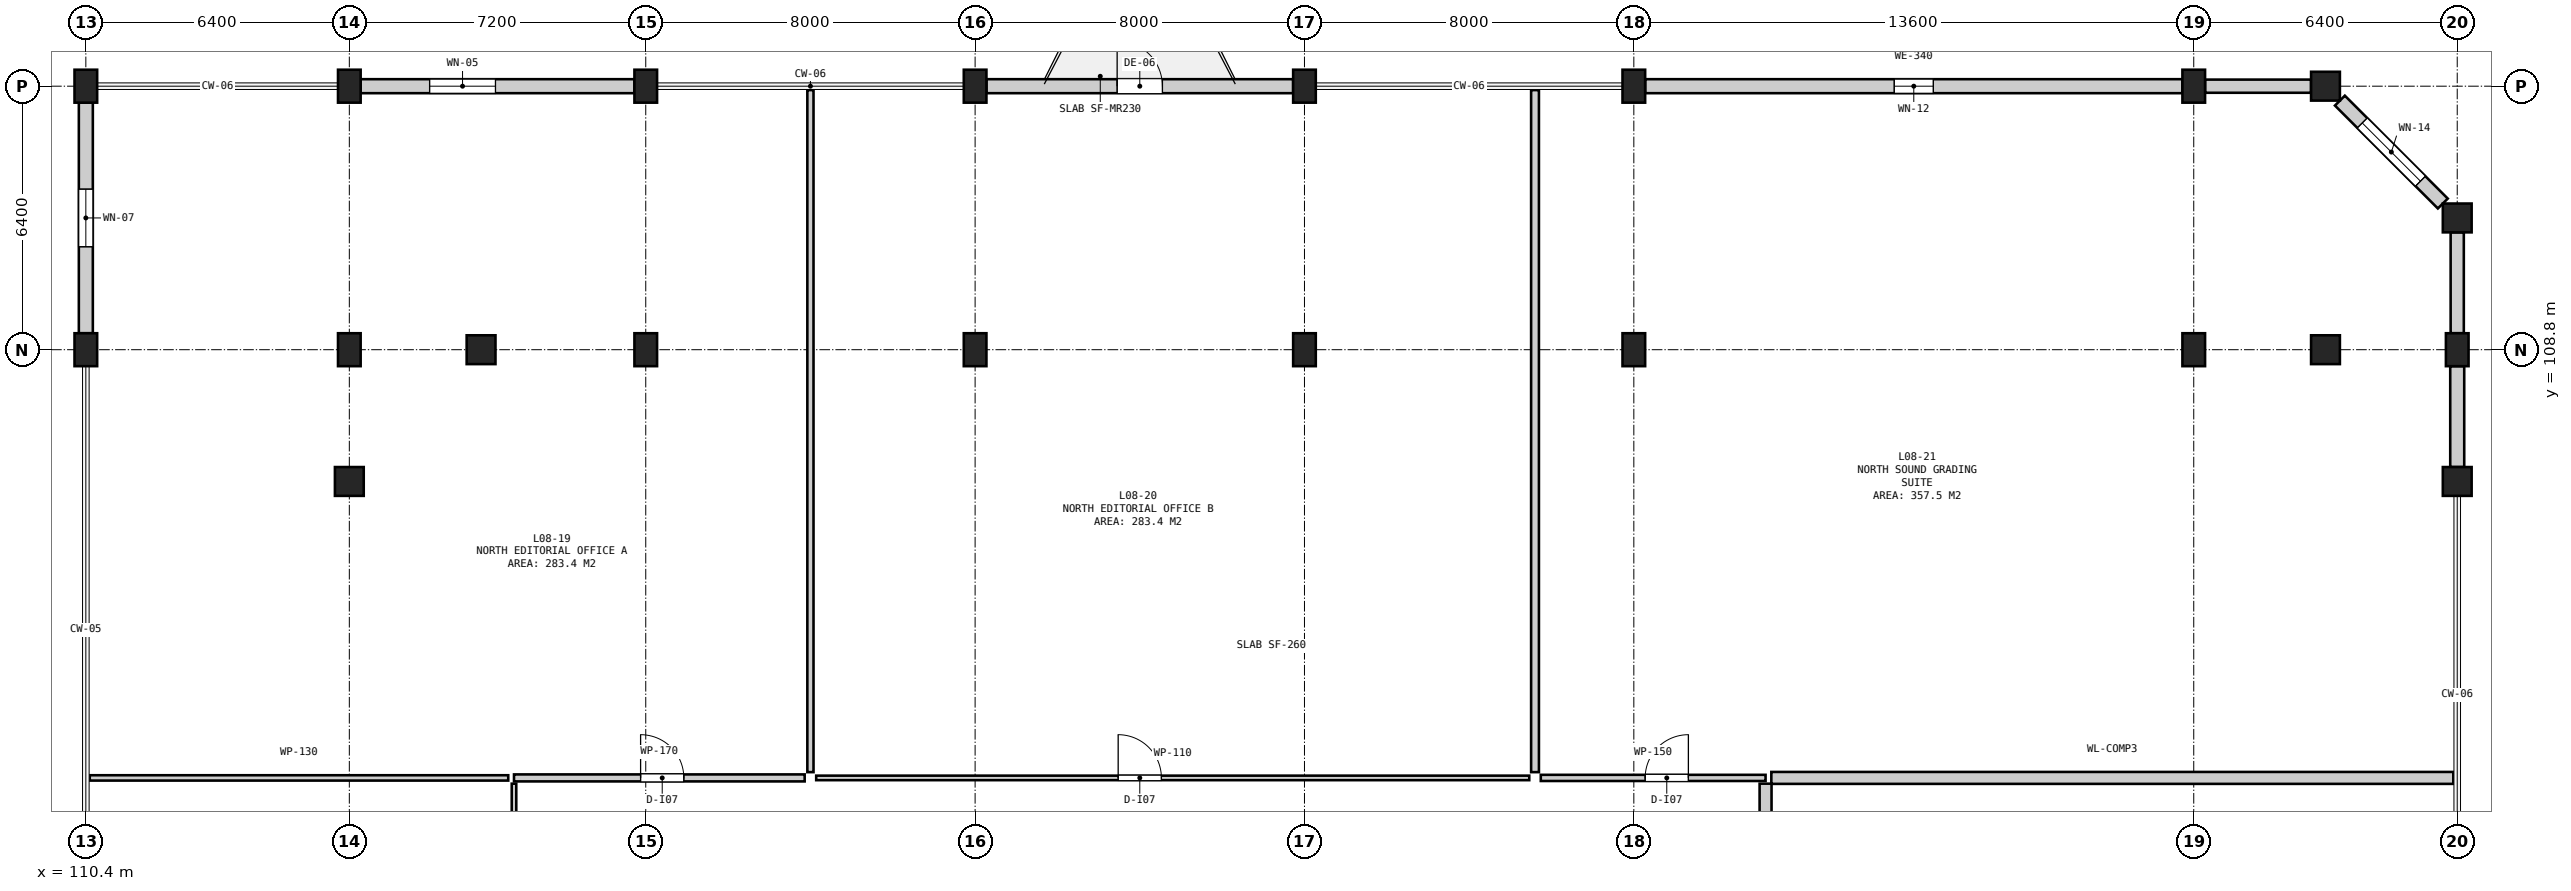
"""IFC4 building model, lengths in metres.
Left out: names, types, materials, properties, quantities, classifications, styles, units other than length and angle.
Written with IfcOpenShell. Run it as: python <this file> out.ifc"""

import sys

from ifc_helpers import new_model, si_unit, direction, frame, frame_2d, origin, origin_2d, place, context, subcontext, project, spatial, rectangle, circle, extrude, element, fill, save


model = new_model("IFC4")
c1 = context("Model", 3, precision=1e-05, world=origin(), true_north=direction((0.0, 1.0)))
c2 = subcontext(c1, "Body", "Model", "MODEL_VIEW")
j1 = project(units=[si_unit("LENGTHUNIT", "METRE"), si_unit("PLANEANGLEUNIT", "RADIAN")], contexts=[c1])
p1 = place(None, origin())
s1 = spatial("IfcSite", under=j1, at=p1, CompositionType="ELEMENT")
p2 = place(p1, origin())
s2 = spatial("IfcBuilding", under=s1, at=p2, CompositionType="ELEMENT")
p3 = place(p2, frame((0.0, 0.0, 35.6)))
s3 = spatial("IfcBuildingStorey", under=s2, at=p3, CompositionType="ELEMENT", Elevation=35.6)
for number, where, z_axis, x_axis in (
    (1, (110.4, 108.8, 0.0), (0.0, 0.0, 1.0), (1.0, 0.0, 0.0)),
    (2, (110.4, 115.2, 0.0), (0.0, 0.0, 1.0), (1.0, 0.0, 0.0)),
):
    element("IfcColumn", number, at=place(p3, frame(where, z_axis=z_axis, x_axis=x_axis)), inside=s3, PredefinedType="COLUMN", context=c2, shape_type="SweptSolid", body=[
        extrude(rectangle(XDim=0.55, YDim=0.8, at=origin_2d()), origin(), (0.0, 0.0, 1.0), 3.9),
    ])
p4 = place(p3, frame((116.8, 105.6, 0.0), z_axis=(0.0, 0.0, 1.0), x_axis=(1.0, 0.0, 0.0)))
e3 = element("IfcColumn", 3, at=p4, inside=s3, PredefinedType="COLUMN", context=c2, shape_type="SweptSolid", body=[
    extrude(circle(Radius=0.35, at=origin_2d()), origin(), (0.0, 0.0, 1.0), 3.9),
])
for number, where, z_axis, x_axis in (
    (4, (116.8, 108.8, 0.0), (0.0, 0.0, 1.0), (1.0, 0.0, 0.0)),
    (5, (116.8, 115.2, 0.0), (0.0, 0.0, 1.0), (1.0, 0.0, 0.0)),
):
    element("IfcColumn", number, at=place(p3, frame(where, z_axis=z_axis, x_axis=x_axis)), inside=s3, PredefinedType="COLUMN", context=c2, shape_type="SweptSolid", body=[
        extrude(rectangle(XDim=0.55, YDim=0.8, at=origin_2d()), origin(), (0.0, 0.0, 1.0), 3.9),
    ])
p5 = place(p3, frame((120.0, 108.8, 0.0), z_axis=(0.0, 0.0, 1.0), x_axis=(1.0, 0.0, 0.0)))
e6 = element("IfcColumn", 6, at=p5, inside=s3, PredefinedType="COLUMN", context=c2, shape_type="SweptSolid", body=[
    extrude(circle(Radius=0.35, at=origin_2d()), origin(), (0.0, 0.0, 1.0), 3.9),
])
for number, where, z_axis, x_axis in (
    (7, (124.0, 108.8, 0.0), (0.0, 0.0, 1.0), (1.0, 0.0, 0.0)),
    (8, (124.0, 115.2, 0.0), (0.0, 0.0, 1.0), (1.0, 0.0, 0.0)),
    (9, (132.0, 108.8, 0.0), (0.0, 0.0, 1.0), (1.0, 0.0, 0.0)),
    (10, (132.0, 115.2, 0.0), (0.0, 0.0, 1.0), (1.0, 0.0, 0.0)),
    (11, (140.0, 108.8, 0.0), (0.0, 0.0, 1.0), (1.0, 0.0, 0.0)),
    (12, (140.0, 115.2, 0.0), (0.0, 0.0, 1.0), (1.0, 0.0, 0.0)),
    (13, (148.0, 108.8, 0.0), (0.0, 0.0, 1.0), (1.0, 0.0, 0.0)),
    (14, (148.0, 115.2, 0.0), (0.0, 0.0, 1.0), (1.0, 0.0, 0.0)),
    (15, (161.6, 108.8, 0.0), (0.0, 0.0, 1.0), (1.0, 0.0, 0.0)),
    (16, (161.6, 115.2, 0.0), (0.0, 0.0, 1.0), (1.0, 0.0, 0.0)),
):
    element("IfcColumn", number, at=place(p3, frame(where, z_axis=z_axis, x_axis=x_axis)), inside=s3, PredefinedType="COLUMN", context=c2, shape_type="SweptSolid", body=[
        extrude(rectangle(XDim=0.55, YDim=0.8, at=origin_2d()), origin(), (0.0, 0.0, 1.0), 3.9),
    ])
for number, where, z_axis, x_axis in (
    (17, (164.8, 108.8, 0.0), (0.0, 0.0, 1.0), (1.0, 0.0, 0.0)),
    (18, (164.8, 115.2, 0.0), (0.0, 0.0, 1.0), (1.0, 0.0, 0.0)),
    (19, (168.0, 105.6, 0.0), (0.0, 0.0, 1.0), (1.0, 0.0, 0.0)),
):
    element("IfcColumn", number, at=place(p3, frame(where, z_axis=z_axis, x_axis=x_axis)), inside=s3, PredefinedType="COLUMN", context=c2, shape_type="SweptSolid", body=[
        extrude(circle(Radius=0.35, at=origin_2d()), origin(), (0.0, 0.0, 1.0), 3.9),
    ])
p6 = place(p3, frame((168.0, 108.8, 0.0), z_axis=(0.0, 0.0, 1.0), x_axis=(1.0, 0.0, 0.0)))
e20 = element("IfcColumn", 20, at=p6, inside=s3, PredefinedType="COLUMN", context=c2, shape_type="SweptSolid", body=[
    extrude(rectangle(XDim=0.55, YDim=0.8, at=origin_2d()), origin(), (0.0, 0.0, 1.0), 3.9),
])
p7 = place(p3, frame((168.0, 112.0, 0.0), z_axis=(0.0, 0.0, 1.0), x_axis=(1.0, 0.0, 0.0)))
e21 = element("IfcColumn", 21, at=p7, inside=s3, PredefinedType="COLUMN", context=c2, shape_type="SweptSolid", body=[
    extrude(circle(Radius=0.35, at=origin_2d()), origin(), (0.0, 0.0, 1.0), 3.9),
])
p8 = place(p3, frame((168.0, 105.95, 0.0), z_axis=(0.0, 0.0, 1.0), x_axis=(0.0, 1.0, 0.0)))
e22 = element("IfcWall", 22, at=p8, inside=s3, PredefinedType="SOLIDWALL", context=c2, shape_type="SweptSolid", body=[
    extrude(rectangle(XDim=2.45, YDim=0.34, at=frame_2d((1.225, 0.0))), origin(), (0.0, 0.0, 1.0), 2.585),
])
p9 = place(p3, frame((168.0, 109.2, 0.0), z_axis=(0.0, 0.0, 1.0), x_axis=(0.0, 1.0, 0.0)))
e23 = element("IfcWall", 23, at=p9, inside=s3, PredefinedType="SOLIDWALL", context=c2, shape_type="SweptSolid", body=[
    extrude(rectangle(XDim=2.45, YDim=0.32, at=frame_2d((1.225, 0.0))), origin(), (0.0, 0.0, 1.0), 3.0),
])
p10 = place(p3, frame((167.65, 112.35, 0.0), z_axis=(0.0, 0.0, 1.0), x_axis=(-0.707106781187, 0.707106781187, 0.0)))
e24 = element("IfcWall", 24, at=p10, inside=s3, PredefinedType="SOLIDWALL", context=c2, shape_type="SweptSolid", body=[
    extrude(rectangle(XDim=3.536, YDim=0.34, at=frame_2d((1.768, 0.0))), origin(), (0.0, 0.0, 1.0), 2.995),
])
p11 = place(p10, frame((0.768, 0.0, 0.9)))
e25 = element("IfcOpeningElement", 25, at=p11, cuts=e24, PredefinedType="OPENING", context=c2, shape_type="SweptSolid", body=[
    extrude(rectangle(XDim=2.0, YDim=1.65, at=frame_2d((1.0, 0.825))), frame((0.0, 0.182, 0.0), z_axis=(0.0, -1.0, 0.0), x_axis=(1.0, 0.0, 0.0)), (0.0, 0.0, 1.0), 0.364),
])
p12 = place(p3, frame((164.45, 115.2, 0.0), z_axis=(0.0, 0.0, 1.0), x_axis=(-1.0, 0.0, 0.0)))
e26 = element("IfcWall", 26, at=p12, inside=s3, PredefinedType="SOLIDWALL", context=c2, shape_type="SweptSolid", body=[
    extrude(rectangle(XDim=2.575, YDim=0.32, at=frame_2d((1.288, 0.0))), origin(), (0.0, 0.0, 1.0), 3.0),
])
p13 = place(p3, frame((161.325, 115.2, 0.0), z_axis=(0.0, 0.0, 1.0), x_axis=(-1.0, 0.0, 0.0)))
e27 = element("IfcWall", 27, at=p13, inside=s3, PredefinedType="SOLIDWALL", context=c2, shape_type="SweptSolid", body=[
    extrude(rectangle(XDim=13.05, YDim=0.34, at=frame_2d((6.525, 0.0))), origin(), (0.0, 0.0, 1.0), 2.535),
])
p14 = place(p13, frame((6.05, 0.0, 0.8)))
e28 = element("IfcOpeningElement", 28, at=p14, cuts=e27, PredefinedType="OPENING", context=c2, shape_type="SweptSolid", body=[
    extrude(rectangle(XDim=0.95, YDim=1.45, at=frame_2d((0.475, 0.725))), frame((0.0, 0.182, 0.0), z_axis=(0.0, -1.0, 0.0), x_axis=(1.0, 0.0, 0.0)), (0.0, 0.0, 1.0), 0.364),
])
p15 = place(p3, frame((139.725, 115.2, 0.0), z_axis=(0.0, 0.0, 1.0), x_axis=(-1.0, 0.0, 0.0)))
e29 = element("IfcWall", 29, at=p15, inside=s3, PredefinedType="SOLIDWALL", context=c2, shape_type="SweptSolid", body=[
    extrude(rectangle(XDim=7.45, YDim=0.34, at=frame_2d((3.725, 0.0))), origin(), (0.0, 0.0, 1.0), 3.0),
])
p16 = place(p15, frame((3.175, 0.0, 0.0)))
e30 = element("IfcOpeningElement", 30, at=p16, cuts=e29, PredefinedType="OPENING", context=c2, shape_type="SweptSolid", body=[
    extrude(rectangle(XDim=1.1, YDim=2.2, at=frame_2d((0.55, 1.1))), frame((0.0, 0.182, 0.0), z_axis=(0.0, -1.0, 0.0), x_axis=(1.0, 0.0, 0.0)), (0.0, 0.0, 1.0), 0.364),
])
p17 = place(p3, frame((123.725, 115.2, 0.0), z_axis=(0.0, 0.0, 1.0), x_axis=(-1.0, 0.0, 0.0)))
e31 = element("IfcWall", 31, at=p17, inside=s3, PredefinedType="SOLIDWALL", context=c2, shape_type="SweptSolid", body=[
    extrude(rectangle(XDim=6.65, YDim=0.34, at=frame_2d((3.325, 0.0))), origin(), (0.0, 0.0, 1.0), 3.0),
])
p18 = place(p17, frame((3.375, 0.0, 0.9)))
e32 = element("IfcOpeningElement", 32, at=p18, cuts=e31, PredefinedType="OPENING", context=c2, shape_type="SweptSolid", body=[
    extrude(rectangle(XDim=1.6, YDim=1.95, at=frame_2d((0.8, 0.975))), frame((0.0, 0.182, 0.0), z_axis=(0.0, -1.0, 0.0), x_axis=(1.0, 0.0, 0.0)), (0.0, 0.0, 1.0), 0.364),
])
p19 = place(p3, frame((110.4, 114.8, 0.0), z_axis=(0.0, 0.0, 1.0), x_axis=(0.0, -1.0, 0.0)))
e33 = element("IfcWall", 33, at=p19, inside=s3, PredefinedType="SOLIDWALL", context=c2, shape_type="SweptSolid", body=[
    extrude(rectangle(XDim=5.6, YDim=0.34, at=frame_2d((2.8, 0.0))), origin(), (0.0, 0.0, 1.0), 3.0),
])
p20 = place(p19, frame((2.1, 0.0, 0.9)))
e34 = element("IfcOpeningElement", 34, at=p20, cuts=e33, PredefinedType="OPENING", context=c2, shape_type="SweptSolid", body=[
    extrude(rectangle(XDim=1.4, YDim=1.8, at=frame_2d((0.7, 0.9))), frame((0.0, 0.182, 0.0), z_axis=(0.0, -1.0, 0.0), x_axis=(1.0, 0.0, 0.0)), (0.0, 0.0, 1.0), 0.364),
])
p21 = place(p3, frame((151.34, 98.4, 0.0), z_axis=(0.0, 0.0, 1.0), x_axis=(1.0, 0.0, 0.0)))
e35 = element("IfcWall", 35, at=p21, inside=s3, PredefinedType="SOLIDWALL", context=c2, shape_type="SweptSolid", body=[
    extrude(rectangle(XDim=16.565, YDim=0.29, at=frame_2d((8.282, 0.0))), origin(), (0.0, 0.0, 1.0), 3.62),
])
p22 = place(p3, frame((151.2, 76.0, 0.0), z_axis=(0.0, 0.0, 1.0), x_axis=(0.0, 1.0, 0.0)))
e36 = element("IfcWall", 36, at=p22, inside=s3, PredefinedType="SOLIDWALL", context=c2, shape_type="SweptSolid", body=[
    extrude(rectangle(XDim=22.26, YDim=0.29, at=frame_2d((11.13, 0.0))), origin(), (0.0, 0.0, 1.0), 3.62),
])
p23 = place(p22, frame((10.5, 0.0, 0.0)))
e37 = element("IfcOpeningElement", 37, at=p23, cuts=e36, PredefinedType="OPENING", context=c2, shape_type="SweptSolid", body=[
    extrude(rectangle(XDim=1.4, YDim=2.2, at=frame_2d((0.7, 1.1))), frame((0.0, 0.157, 0.0), z_axis=(0.0, -1.0, 0.0), x_axis=(1.0, 0.0, 0.0)), (0.0, 0.0, 1.0), 0.314),
])
p24 = place(p3, frame((110.495, 98.4, 0.0), z_axis=(0.0, 0.0, 1.0), x_axis=(1.0, 0.0, 0.0)))
e38 = element("IfcWall", 38, at=p24, inside=s3, PredefinedType="PARTITIONING", context=c2, shape_type="SweptSolid", body=[
    extrude(rectangle(XDim=10.165, YDim=0.13, at=frame_2d((5.083, 0.0))), origin(), (0.0, 0.0, 1.0), 3.62),
])
p25 = place(p3, frame((120.8, 76.14, 0.0), z_axis=(0.0, 0.0, 1.0), x_axis=(0.0, 1.0, 0.0)))
e39 = element("IfcWall", 39, at=p25, inside=s3, PredefinedType="PARTITIONING", context=c2, shape_type="SweptSolid", body=[
    extrude(rectangle(XDim=22.12, YDim=0.11, at=frame_2d((11.06, 0.0))), origin(), (0.0, 0.0, 1.0), 3.62),
])
p26 = place(p25, frame((10.535, 0.0, 0.0)))
e40 = element("IfcOpeningElement", 40, at=p26, cuts=e39, PredefinedType="OPENING", context=c2, shape_type="SweptSolid", body=[
    extrude(rectangle(XDim=1.05, YDim=2.15, at=frame_2d((0.525, 1.075))), frame((0.0, 0.067, 0.0), z_axis=(0.0, -1.0, 0.0), x_axis=(1.0, 0.0, 0.0)), (0.0, 0.0, 1.0), 0.134),
])
p27 = place(p3, frame((120.8, 98.4, 0.0), z_axis=(0.0, 0.0, 1.0), x_axis=(1.0, 0.0, 0.0)))
e41 = element("IfcWall", 41, at=p27, inside=s3, PredefinedType="PARTITIONING", context=c2, shape_type="SweptSolid", body=[
    extrude(rectangle(XDim=7.06, YDim=0.17, at=frame_2d((3.53, 0.0))), origin(), (0.0, 0.0, 1.0), 3.62),
])
p28 = place(p27, frame((3.075, 0.0, 0.0)))
e42 = element("IfcOpeningElement", 42, at=p28, cuts=e41, PredefinedType="OPENING", context=c2, shape_type="SweptSolid", body=[
    extrude(rectangle(XDim=1.05, YDim=2.15, at=frame_2d((0.525, 1.075))), frame((0.0, 0.097, 0.0), z_axis=(0.0, -1.0, 0.0), x_axis=(1.0, 0.0, 0.0)), (0.0, 0.0, 1.0), 0.194),
])
p29 = place(p3, frame((128.0, 98.54, 0.0), z_axis=(0.0, 0.0, 1.0), x_axis=(0.0, 1.0, 0.0)))
e43 = element("IfcWall", 43, at=p29, inside=s3, PredefinedType="PARTITIONING", context=c2, shape_type="SweptSolid", body=[
    extrude(rectangle(XDim=16.565, YDim=0.15, at=frame_2d((8.282, 0.0))), origin(), (0.0, 0.0, 1.0), 3.62),
])
p30 = place(p3, frame((128.14, 98.4, 0.0), z_axis=(0.0, 0.0, 1.0), x_axis=(1.0, 0.0, 0.0)))
e44 = element("IfcWall", 44, at=p30, inside=s3, PredefinedType="PARTITIONING", context=c2, shape_type="SweptSolid", body=[
    extrude(rectangle(XDim=17.32, YDim=0.11, at=frame_2d((8.66, 0.0))), origin(), (0.0, 0.0, 1.0), 3.62),
])
p31 = place(p30, frame((7.335, 0.0, 0.0)))
e45 = element("IfcOpeningElement", 45, at=p31, cuts=e44, PredefinedType="OPENING", context=c2, shape_type="SweptSolid", body=[
    extrude(rectangle(XDim=1.05, YDim=2.15, at=frame_2d((0.525, 1.075))), frame((0.0, 0.067, 0.0), z_axis=(0.0, -1.0, 0.0), x_axis=(1.0, 0.0, 0.0)), (0.0, 0.0, 1.0), 0.134),
])
p32 = place(p3, frame((145.6, 98.54, 0.0), z_axis=(0.0, 0.0, 1.0), x_axis=(0.0, 1.0, 0.0)))
e46 = element("IfcWall", 46, at=p32, inside=s3, PredefinedType="PARTITIONING", context=c2, shape_type="SweptSolid", body=[
    extrude(rectangle(XDim=16.565, YDim=0.19, at=frame_2d((8.282, 0.0))), origin(), (0.0, 0.0, 1.0), 3.62),
])
p33 = place(p3, frame((145.74, 98.4, 0.0), z_axis=(0.0, 0.0, 1.0), x_axis=(1.0, 0.0, 0.0)))
e47 = element("IfcWall", 47, at=p33, inside=s3, PredefinedType="PARTITIONING", context=c2, shape_type="SweptSolid", body=[
    extrude(rectangle(XDim=5.46, YDim=0.15, at=frame_2d((2.73, 0.0))), origin(), (0.0, 0.0, 1.0), 3.62),
])
p34 = place(p33, frame((2.535, 0.0, 0.0)))
e48 = element("IfcOpeningElement", 48, at=p34, cuts=e47, PredefinedType="OPENING", context=c2, shape_type="SweptSolid", body=[
    extrude(rectangle(XDim=1.05, YDim=2.15, at=frame_2d((0.525, 1.075))), frame((0.0, 0.087, 0.0), z_axis=(0.0, -1.0, 0.0), x_axis=(1.0, 0.0, 0.0)), (0.0, 0.0, 1.0), 0.174),
])
p35 = place(p11, origin())
e49 = element("IfcWindow", 49, at=p35, inside=s3, PartitioningType="DOUBLE_PANEL_HORIZONTAL", PredefinedType="WINDOW", context=c2, shape_type="SweptSolid", body=[
    extrude(rectangle(XDim=2.0, YDim=1.65, at=frame_2d((1.0, 0.825))), frame((0.0, 0.03, 0.0), z_axis=(0.0, -1.0, 0.0), x_axis=(1.0, 0.0, 0.0)), (0.0, 0.0, 1.0), 0.06),
])
fill(e25, e49)
p36 = place(p14, origin())
e50 = element("IfcWindow", 50, at=p36, inside=s3, PartitioningType="SINGLE_PANEL", PredefinedType="WINDOW", context=c2, shape_type="SweptSolid", body=[
    extrude(rectangle(XDim=0.95, YDim=1.45, at=frame_2d((0.475, 0.725))), frame((0.0, 0.03, 0.0), z_axis=(0.0, -1.0, 0.0), x_axis=(1.0, 0.0, 0.0)), (0.0, 0.0, 1.0), 0.06),
])
fill(e28, e50)
p37 = place(p16, frame((1.1, 0.0, 0.0), z_axis=(0.0, 0.0, 1.0), x_axis=(-1.0, 0.0, 0.0)))
e51 = element("IfcDoor", 51, at=p37, inside=s3, OperationType="SINGLE_SWING_LEFT", PredefinedType="DOOR", context=c2, shape_type="SweptSolid", body=[
    extrude(rectangle(XDim=1.1, YDim=2.2, at=frame_2d((0.55, 1.1))), frame((0.0, 0.025, 0.0), z_axis=(0.0, -1.0, 0.0), x_axis=(1.0, 0.0, 0.0)), (0.0, 0.0, 1.0), 0.05),
])
fill(e30, e51)
p38 = place(p18, origin())
e52 = element("IfcWindow", 52, at=p38, inside=s3, PartitioningType="DOUBLE_PANEL_VERTICAL", PredefinedType="WINDOW", context=c2, shape_type="SweptSolid", body=[
    extrude(rectangle(XDim=1.6, YDim=1.95, at=frame_2d((0.8, 0.975))), frame((0.0, 0.03, 0.0), z_axis=(0.0, -1.0, 0.0), x_axis=(1.0, 0.0, 0.0)), (0.0, 0.0, 1.0), 0.06),
])
fill(e32, e52)
p39 = place(p20, origin())
e53 = element("IfcWindow", 53, at=p39, inside=s3, PartitioningType="SINGLE_PANEL", PredefinedType="WINDOW", context=c2, shape_type="SweptSolid", body=[
    extrude(rectangle(XDim=1.4, YDim=1.8, at=frame_2d((0.7, 0.9))), frame((0.0, 0.03, 0.0), z_axis=(0.0, -1.0, 0.0), x_axis=(1.0, 0.0, 0.0)), (0.0, 0.0, 1.0), 0.06),
])
fill(e34, e53)
p40 = place(p28, origin())
e54 = element("IfcDoor", 54, at=p40, inside=s3, OperationType="SINGLE_SWING_LEFT", PredefinedType="DOOR", context=c2, shape_type="SweptSolid", body=[
    extrude(rectangle(XDim=1.05, YDim=2.15, at=frame_2d((0.525, 1.075))), frame((0.0, 0.025, 0.0), z_axis=(0.0, -1.0, 0.0), x_axis=(1.0, 0.0, 0.0)), (0.0, 0.0, 1.0), 0.05),
])
fill(e42, e54)
p41 = place(p31, origin())
e55 = element("IfcDoor", 55, at=p41, inside=s3, OperationType="SINGLE_SWING_LEFT", PredefinedType="DOOR", context=c2, shape_type="SweptSolid", body=[
    extrude(rectangle(XDim=1.05, YDim=2.15, at=frame_2d((0.525, 1.075))), frame((0.0, 0.025, 0.0), z_axis=(0.0, -1.0, 0.0), x_axis=(1.0, 0.0, 0.0)), (0.0, 0.0, 1.0), 0.05),
])
fill(e45, e55)
p42 = place(p34, origin())
e56 = element("IfcDoor", 56, at=p42, inside=s3, OperationType="SINGLE_SWING_RIGHT", PredefinedType="DOOR", context=c2, shape_type="SweptSolid", body=[
    extrude(rectangle(XDim=1.05, YDim=2.15, at=frame_2d((0.525, 1.075))), frame((0.0, 0.025, 0.0), z_axis=(0.0, -1.0, 0.0), x_axis=(1.0, 0.0, 0.0)), (0.0, 0.0, 1.0), 0.05),
])
fill(e48, e56)
save(model, sys.argv[1])
